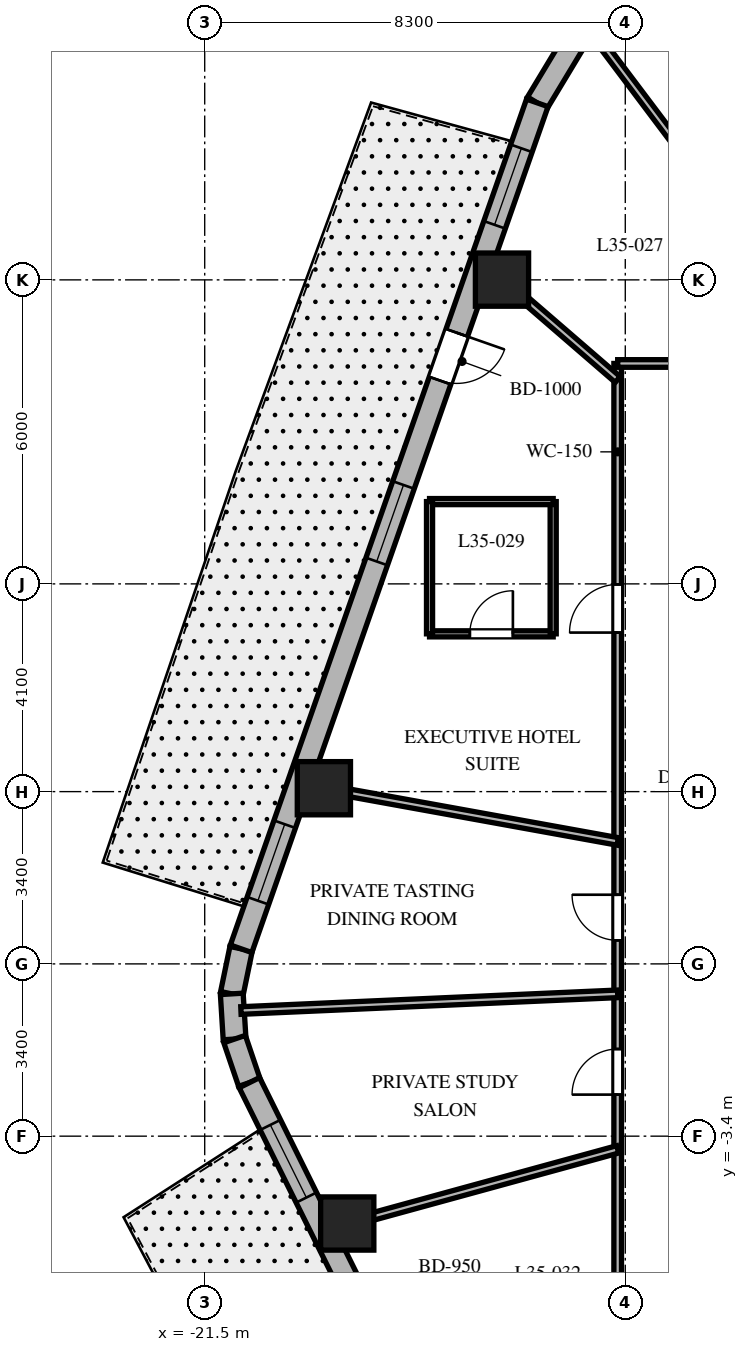
"""IFC4 building model, lengths in metres.
Left out: names, types, materials, properties, quantities, classifications, styles, units other than length and angle.
Written with IfcOpenShell. Run it as: python <this file> out.ifc"""

import sys

from ifc_helpers import new_model, si_unit, direction, frame, frame_2d, origin, origin_2d, place, context, subcontext, project, spatial, rectangle, extrude, element, fill, save


model = new_model("IFC4")
c1 = context("Model", 3, precision=1e-05, world=origin(), true_north=direction((0.0, 1.0)))
c2 = subcontext(c1, "Body", "Model", "MODEL_VIEW")
j1 = project(units=[si_unit("LENGTHUNIT", "METRE"), si_unit("PLANEANGLEUNIT", "RADIAN")], contexts=[c1])
p1 = place(None, origin())
s1 = spatial("IfcSite", under=j1, at=p1, CompositionType="ELEMENT")
p2 = place(p1, origin())
s2 = spatial("IfcBuilding", under=s1, at=p2, CompositionType="ELEMENT")
p3 = place(p2, frame((0.0, 0.0, 144.3)))
s3 = spatial("IfcBuildingStorey", under=s2, at=p3, CompositionType="ELEMENT", Elevation=144.3)
for number, where, z_axis, x_axis in (
    (1, (-15.633, 13.505, 0.0), (0.0, 0.0, 1.0), (1.0, 0.0, 0.0)),
    (2, (-19.148, 3.467, 0.0), (0.0, 0.0, 1.0), (1.0, 0.0, 0.0)),
    (3, (-18.687, -5.124, 0.0), (0.0, 0.0, 1.0), (1.0, 0.0, 0.0)),
):
    element("IfcColumn", number, at=place(p3, frame(where, z_axis=z_axis, x_axis=x_axis)), inside=s3, PredefinedType="COLUMN", context=c2, shape_type="SweptSolid", body=[
        extrude(rectangle(XDim=1.05, YDim=1.05, at=origin_2d()), origin(), (0.0, 0.0, 1.0), 3.7),
    ])
p4 = place(p3, frame((-14.214, 18.192, 0.0), z_axis=(0.0, 0.0, 1.0), x_axis=(-0.516340945502, -0.856383108193, 0.0)))
e4 = element("IfcWall", 4, at=p4, inside=s3, PredefinedType="SOLIDWALL", context=c2, shape_type="SweptSolid", body=[
    extrude(rectangle(XDim=1.4, YDim=0.45, at=frame_2d((0.7, 0.0))), origin(), (0.0, 0.0, 1.0), 3.4),
])
p5 = place(p3, frame((-20.782, 0.298, 0.0), z_axis=(0.0, 0.0, 1.0), x_axis=(-0.202570068411, -0.979267771033, 0.0)))
e5 = element("IfcWall", 5, at=p5, inside=s3, PredefinedType="SOLIDWALL", context=c2, shape_type="SweptSolid", body=[
    extrude(rectangle(XDim=0.909, YDim=0.45, at=frame_2d((0.454, 0.0))), origin(), (0.0, 0.0, 1.0), 3.4),
])
p6 = place(p3, frame((-20.966, -0.592, 0.0), z_axis=(0.0, 0.0, 1.0), x_axis=(0.061748898935, -0.998091715966, 0.0)))
e6 = element("IfcWall", 6, at=p6, inside=s3, PredefinedType="SOLIDWALL", context=c2, shape_type="SweptSolid", body=[
    extrude(rectangle(XDim=0.894, YDim=0.45, at=frame_2d((0.447, 0.0))), origin(), (0.0, 0.0, 1.0), 3.4),
])
p7 = place(p3, frame((-20.911, -1.484, 0.0), z_axis=(0.0, 0.0, 1.0), x_axis=(0.321623334353, -0.946867694453, 0.0)))
e7 = element("IfcWall", 7, at=p7, inside=s3, PredefinedType="SOLIDWALL", context=c2, shape_type="SweptSolid", body=[
    extrude(rectangle(XDim=0.909, YDim=0.45, at=frame_2d((0.454, 0.0))), origin(), (0.0, 0.0, 1.0), 3.4),
])
p8 = place(p3, frame((-14.937, 16.993, 0.0), z_axis=(0.0, 0.0, 1.0), x_axis=(-0.330431575061, -0.943829949834, 0.0)))
e8 = element("IfcWall", 8, at=p8, inside=s3, PredefinedType="SOLIDWALL", context=c2, shape_type="SweptSolid", body=[
    extrude(rectangle(XDim=17.689, YDim=0.45, at=frame_2d((8.844, 0.0))), origin(), (0.0, 0.0, 1.0), 3.4),
])
p9 = place(p8, frame((4.807, 0.0, 0.0)))
e9 = element("IfcOpeningElement", 9, at=p9, cuts=e8, PredefinedType="OPENING", context=c2, shape_type="SweptSolid", body=[
    extrude(rectangle(XDim=1.0, YDim=2.15, at=frame_2d((0.5, 1.075))), frame((0.0, 0.235, 0.0), z_axis=(0.0, -1.0, 0.0), x_axis=(1.0, 0.0, 0.0)), (0.0, 0.0, 1.0), 0.47),
])
p10 = place(p8, frame((0.95, 0.0, 0.8)))
e10 = element("IfcOpeningElement", 10, at=p10, cuts=e8, PredefinedType="OPENING", context=c2, shape_type="SweptSolid", body=[
    extrude(rectangle(XDim=1.6, YDim=1.75, at=frame_2d((0.8, 0.875))), frame((0.0, 0.235, 0.0), z_axis=(0.0, -1.0, 0.0), x_axis=(1.0, 0.0, 0.0)), (0.0, 0.0, 1.0), 0.47),
])
p11 = place(p8, frame((7.99, 0.0, 0.8)))
e11 = element("IfcOpeningElement", 11, at=p11, cuts=e8, PredefinedType="OPENING", context=c2, shape_type="SweptSolid", body=[
    extrude(rectangle(XDim=1.6, YDim=1.75, at=frame_2d((0.8, 0.875))), frame((0.0, 0.235, 0.0), z_axis=(0.0, -1.0, 0.0), x_axis=(1.0, 0.0, 0.0)), (0.0, 0.0, 1.0), 0.47),
])
p12 = place(p8, frame((15.084, 0.0, 0.8)))
e12 = element("IfcOpeningElement", 12, at=p12, cuts=e8, PredefinedType="OPENING", context=c2, shape_type="SweptSolid", body=[
    extrude(rectangle(XDim=1.6, YDim=1.75, at=frame_2d((0.8, 0.875))), frame((0.0, 0.235, 0.0), z_axis=(0.0, -1.0, 0.0), x_axis=(1.0, 0.0, 0.0)), (0.0, 0.0, 1.0), 0.47),
])
p13 = place(p3, frame((-20.618, -2.344, 0.0), z_axis=(0.0, 0.0, 1.0), x_axis=(0.444243691097, -0.895905990002, 0.0)))
e13 = element("IfcWall", 13, at=p13, inside=s3, PredefinedType="SOLIDWALL", context=c2, shape_type="SweptSolid", body=[
    extrude(rectangle(XDim=16.784, YDim=0.45, at=frame_2d((8.392, 0.0))), origin(), (0.0, 0.0, 1.0), 3.4),
])
p14 = place(p13, frame((4.535, 0.0, 0.0)))
e14 = element("IfcOpeningElement", 14, at=p14, cuts=e13, PredefinedType="OPENING", context=c2, shape_type="SweptSolid", body=[
    extrude(rectangle(XDim=0.95, YDim=2.15, at=frame_2d((0.475, 1.075))), frame((0.0, 0.235, 0.0), z_axis=(0.0, -1.0, 0.0), x_axis=(1.0, 0.0, 0.0)), (0.0, 0.0, 1.0), 0.47),
])
p15 = place(p13, frame((0.931, 0.0, 0.8)))
e15 = element("IfcOpeningElement", 15, at=p15, cuts=e13, PredefinedType="OPENING", context=c2, shape_type="SweptSolid", body=[
    extrude(rectangle(XDim=1.6, YDim=1.75, at=frame_2d((0.8, 0.875))), frame((0.0, 0.235, 0.0), z_axis=(0.0, -1.0, 0.0), x_axis=(1.0, 0.0, 0.0)), (0.0, 0.0, 1.0), 0.47),
])
p16 = place(p13, frame((7.642, 0.0, 0.8)))
e16 = element("IfcOpeningElement", 16, at=p16, cuts=e13, PredefinedType="OPENING", context=c2, shape_type="SweptSolid", body=[
    extrude(rectangle(XDim=1.6, YDim=1.75, at=frame_2d((0.8, 0.875))), frame((0.0, 0.235, 0.0), z_axis=(0.0, -1.0, 0.0), x_axis=(1.0, 0.0, 0.0)), (0.0, 0.0, 1.0), 0.47),
])
p17 = place(p13, frame((14.303, 0.0, 0.8)))
e17 = element("IfcOpeningElement", 17, at=p17, cuts=e13, PredefinedType="OPENING", context=c2, shape_type="SweptSolid", body=[
    extrude(rectangle(XDim=1.6, YDim=1.75, at=frame_2d((0.8, 0.875))), frame((0.0, 0.235, 0.0), z_axis=(0.0, -1.0, 0.0), x_axis=(1.0, 0.0, 0.0)), (0.0, 0.0, 1.0), 0.47),
])
p18 = place(p3, frame((-13.35, -11.85, 0.0), z_axis=(0.0, 0.0, 1.0), x_axis=(0.0, 1.0, 0.0)))
e18 = element("IfcWall", 18, at=p18, inside=s3, PredefinedType="PARTITIONING", context=c2, shape_type="SweptSolid", body=[
    extrude(rectangle(XDim=23.7, YDim=0.15, at=frame_2d((11.85, 0.0))), origin(), (0.0, 0.0, 1.0), 2.84),
])
p19 = place(p18, frame((18.389, 0.0, 0.0)))
e19 = element("IfcOpeningElement", 19, at=p19, cuts=e18, PredefinedType="OPENING", context=c2, shape_type="SweptSolid", body=[
    extrude(rectangle(XDim=0.95, YDim=2.03, at=frame_2d((0.475, 1.015))), frame((0.0, 0.085, 0.0), z_axis=(0.0, -1.0, 0.0), x_axis=(1.0, 0.0, 0.0)), (0.0, 0.0, 1.0), 0.17),
])
p20 = place(p18, frame((12.315, 0.0, 0.0)))
e20 = element("IfcOpeningElement", 20, at=p20, cuts=e18, PredefinedType="OPENING", context=c2, shape_type="SweptSolid", body=[
    extrude(rectangle(XDim=0.9, YDim=2.03, at=frame_2d((0.45, 1.015))), frame((0.0, 0.085, 0.0), z_axis=(0.0, -1.0, 0.0), x_axis=(1.0, 0.0, 0.0)), (0.0, 0.0, 1.0), 0.17),
])
p21 = place(p18, frame((9.27, 0.0, 0.0)))
e21 = element("IfcOpeningElement", 21, at=p21, cuts=e18, PredefinedType="OPENING", context=c2, shape_type="SweptSolid", body=[
    extrude(rectangle(XDim=0.9, YDim=2.03, at=frame_2d((0.45, 1.015))), frame((0.0, 0.085, 0.0), z_axis=(0.0, -1.0, 0.0), x_axis=(1.0, 0.0, 0.0)), (0.0, 0.0, 1.0), 0.17),
])
p22 = place(p18, frame((3.765, 0.0, 0.0)))
e22 = element("IfcOpeningElement", 22, at=p22, cuts=e18, PredefinedType="OPENING", context=c2, shape_type="SweptSolid", body=[
    extrude(rectangle(XDim=0.9, YDim=2.03, at=frame_2d((0.45, 1.015))), frame((0.0, 0.085, 0.0), z_axis=(0.0, -1.0, 0.0), x_axis=(1.0, 0.0, 0.0)), (0.0, 0.0, 1.0), 0.17),
])
p23 = place(p3, frame((-13.35, 11.85, 0.0), z_axis=(0.0, 0.0, 1.0), x_axis=(1.0, 0.0, 0.0)))
e23 = element("IfcWall", 23, at=p23, inside=s3, PredefinedType="PARTITIONING", context=c2, shape_type="SweptSolid", body=[
    extrude(rectangle(XDim=26.7, YDim=0.15, at=frame_2d((13.35, 0.0))), origin(), (0.0, 0.0, 1.0), 2.84),
])
p24 = place(p23, frame((22.7, 0.0, 0.0)))
e24 = element("IfcOpeningElement", 24, at=p24, cuts=e23, PredefinedType="OPENING", context=c2, shape_type="SweptSolid", body=[
    extrude(rectangle(XDim=0.9, YDim=2.03, at=frame_2d((0.45, 1.015))), frame((0.0, 0.085, 0.0), z_axis=(0.0, -1.0, 0.0), x_axis=(1.0, 0.0, 0.0)), (0.0, 0.0, 1.0), 0.17),
])
p25 = place(p23, frame((18.523, 0.0, 0.0)))
e25 = element("IfcOpeningElement", 25, at=p25, cuts=e23, PredefinedType="OPENING", context=c2, shape_type="SweptSolid", body=[
    extrude(rectangle(XDim=0.95, YDim=2.03, at=frame_2d((0.475, 1.015))), frame((0.0, 0.085, 0.0), z_axis=(0.0, -1.0, 0.0), x_axis=(1.0, 0.0, 0.0)), (0.0, 0.0, 1.0), 0.17),
])
p26 = place(p23, frame((12.362, 0.0, 0.0)))
e26 = element("IfcOpeningElement", 26, at=p26, cuts=e23, PredefinedType="OPENING", context=c2, shape_type="SweptSolid", body=[
    extrude(rectangle(XDim=0.95, YDim=2.03, at=frame_2d((0.475, 1.015))), frame((0.0, 0.085, 0.0), z_axis=(0.0, -1.0, 0.0), x_axis=(1.0, 0.0, 0.0)), (0.0, 0.0, 1.0), 0.17),
])
p27 = place(p23, frame((6.061, 0.0, 0.0)))
e27 = element("IfcOpeningElement", 27, at=p27, cuts=e23, PredefinedType="OPENING", context=c2, shape_type="SweptSolid", body=[
    extrude(rectangle(XDim=0.95, YDim=2.03, at=frame_2d((0.475, 1.015))), frame((0.0, 0.085, 0.0), z_axis=(0.0, -1.0, 0.0), x_axis=(1.0, 0.0, 0.0)), (0.0, 0.0, 1.0), 0.17),
])
p28 = place(p23, frame((1.886, 0.0, 0.0)))
e28 = element("IfcOpeningElement", 28, at=p28, cuts=e23, PredefinedType="OPENING", context=c2, shape_type="SweptSolid", body=[
    extrude(rectangle(XDim=0.9, YDim=2.03, at=frame_2d((0.45, 1.015))), frame((0.0, 0.085, 0.0), z_axis=(0.0, -1.0, 0.0), x_axis=(1.0, 0.0, 0.0)), (0.0, 0.0, 1.0), 0.17),
])
p29 = place(p3, frame((-8.918, 11.85, 0.0), z_axis=(0.0, 0.0, 1.0), x_axis=(-0.601347965064, 0.798987249531, 0.0)))
e29 = element("IfcWall", 29, at=p29, inside=s3, PredefinedType="PARTITIONING", context=c2, shape_type="SweptSolid", body=[
    extrude(rectangle(XDim=8.08, YDim=0.15, at=frame_2d((4.04, 0.0))), origin(), (0.0, 0.0, 1.0), 2.64),
])
p30 = place(p3, frame((-13.35, 11.533, 0.0), z_axis=(0.0, 0.0, 1.0), x_axis=(-0.756711647314, 0.65374879183, 0.0)))
e30 = element("IfcWall", 30, at=p30, inside=s3, PredefinedType="PARTITIONING", context=c2, shape_type="SweptSolid", body=[
    extrude(rectangle(XDim=3.55, YDim=0.15, at=frame_2d((1.775, 0.0))), origin(), (0.0, 0.0, 1.0), 2.64),
])
p31 = place(p3, frame((-13.35, 2.417, 0.0), z_axis=(0.0, 0.0, 1.0), x_axis=(-0.98399796473, 0.178179699761, 0.0)))
e31 = element("IfcWall", 31, at=p31, inside=s3, PredefinedType="PARTITIONING", context=c2, shape_type="SweptSolid", body=[
    extrude(rectangle(XDim=6.393, YDim=0.15, at=frame_2d((3.197, 0.0))), origin(), (0.0, 0.0, 1.0), 2.64),
])
p32 = place(p3, frame((-13.35, -0.591, 0.0), z_axis=(0.0, 0.0, 1.0), x_axis=(-0.999020359631, -0.044252921296, 0.0)))
e32 = element("IfcWall", 32, at=p32, inside=s3, PredefinedType="PARTITIONING", context=c2, shape_type="SweptSolid", body=[
    extrude(rectangle(XDim=7.442, YDim=0.15, at=frame_2d((3.721, 0.0))), origin(), (0.0, 0.0, 1.0), 2.64),
])
p33 = place(p3, frame((-13.35, -3.661, 0.0), z_axis=(0.0, 0.0, 1.0), x_axis=(-0.964397145454, -0.264458211898, 0.0)))
e33 = element("IfcWall", 33, at=p33, inside=s3, PredefinedType="PARTITIONING", context=c2, shape_type="SweptSolid", body=[
    extrude(rectangle(XDim=6.039, YDim=0.15, at=frame_2d((3.019, 0.0))), origin(), (0.0, 0.0, 1.0), 2.64),
])
p34 = place(p3, frame((-17.063, 6.514, 0.0), z_axis=(0.0, 0.0, 1.0), x_axis=(1.0, 0.0, 0.0)))
e34 = element("IfcWall", 34, at=p34, inside=s3, PredefinedType="PARTITIONING", context=c2, shape_type="SweptSolid", body=[
    extrude(rectangle(XDim=2.44, YDim=0.12, at=frame_2d((1.22, 0.0))), origin(), (0.0, 0.0, 1.0), 2.972),
])
p35 = place(p34, frame((0.795, 0.0, 0.0)))
e35 = element("IfcOpeningElement", 35, at=p35, cuts=e34, PredefinedType="OPENING", context=c2, shape_type="SweptSolid", body=[
    extrude(rectangle(XDim=0.85, YDim=2.03, at=frame_2d((0.425, 1.015))), frame((0.0, 0.07, 0.0), z_axis=(0.0, -1.0, 0.0), x_axis=(1.0, 0.0, 0.0)), (0.0, 0.0, 1.0), 0.14),
])
p36 = place(p3, frame((-14.623, 6.514, 0.0), z_axis=(0.0, 0.0, 1.0), x_axis=(0.0, 1.0, 0.0)))
e36 = element("IfcWall", 36, at=p36, inside=s3, PredefinedType="PARTITIONING", context=c2, shape_type="SweptSolid", body=[
    extrude(rectangle(XDim=2.61, YDim=0.12, at=frame_2d((1.305, 0.0))), origin(), (0.0, 0.0, 1.0), 2.972),
])
p37 = place(p3, frame((-14.623, 9.124, 0.0), z_axis=(0.0, 0.0, 1.0), x_axis=(-1.0, 0.0, 0.0)))
e37 = element("IfcWall", 37, at=p37, inside=s3, PredefinedType="PARTITIONING", context=c2, shape_type="SweptSolid", body=[
    extrude(rectangle(XDim=2.44, YDim=0.12, at=frame_2d((1.22, 0.0))), origin(), (0.0, 0.0, 1.0), 2.64),
])
p38 = place(p3, frame((-17.063, 9.124, 0.0), z_axis=(0.0, 0.0, 1.0), x_axis=(0.0, -1.0, 0.0)))
e38 = element("IfcWall", 38, at=p38, inside=s3, PredefinedType="PARTITIONING", context=c2, shape_type="SweptSolid", body=[
    extrude(rectangle(XDim=2.61, YDim=0.12, at=frame_2d((1.305, 0.0))), origin(), (0.0, 0.0, 1.0), 2.64),
])
p39 = place(p9, origin())
e39 = element("IfcDoor", 39, at=p39, inside=s3, OperationType="SINGLE_SWING_LEFT", PredefinedType="DOOR", context=c2, shape_type="SweptSolid", body=[
    extrude(rectangle(XDim=1.0, YDim=2.15, at=frame_2d((0.5, 1.075))), frame((0.0, 0.025, 0.0), z_axis=(0.0, -1.0, 0.0), x_axis=(1.0, 0.0, 0.0)), (0.0, 0.0, 1.0), 0.05),
])
fill(e9, e39)
p40 = place(p10, origin())
e40 = element("IfcWindow", 40, at=p40, inside=s3, PartitioningType="SINGLE_PANEL", PredefinedType="WINDOW", context=c2, shape_type="SweptSolid", body=[
    extrude(rectangle(XDim=1.6, YDim=1.75, at=frame_2d((0.8, 0.875))), frame((0.0, 0.03, 0.0), z_axis=(0.0, -1.0, 0.0), x_axis=(1.0, 0.0, 0.0)), (0.0, 0.0, 1.0), 0.06),
])
fill(e10, e40)
p41 = place(p11, origin())
e41 = element("IfcWindow", 41, at=p41, inside=s3, PartitioningType="SINGLE_PANEL", PredefinedType="WINDOW", context=c2, shape_type="SweptSolid", body=[
    extrude(rectangle(XDim=1.6, YDim=1.75, at=frame_2d((0.8, 0.875))), frame((0.0, 0.03, 0.0), z_axis=(0.0, -1.0, 0.0), x_axis=(1.0, 0.0, 0.0)), (0.0, 0.0, 1.0), 0.06),
])
fill(e11, e41)
p42 = place(p12, origin())
e42 = element("IfcWindow", 42, at=p42, inside=s3, PartitioningType="SINGLE_PANEL", PredefinedType="WINDOW", context=c2, shape_type="SweptSolid", body=[
    extrude(rectangle(XDim=1.6, YDim=1.75, at=frame_2d((0.8, 0.875))), frame((0.0, 0.03, 0.0), z_axis=(0.0, -1.0, 0.0), x_axis=(1.0, 0.0, 0.0)), (0.0, 0.0, 1.0), 0.06),
])
fill(e12, e42)
p43 = place(p15, origin())
e43 = element("IfcWindow", 43, at=p43, inside=s3, PartitioningType="SINGLE_PANEL", PredefinedType="WINDOW", context=c2, shape_type="SweptSolid", body=[
    extrude(rectangle(XDim=1.6, YDim=1.75, at=frame_2d((0.8, 0.875))), frame((0.0, 0.03, 0.0), z_axis=(0.0, -1.0, 0.0), x_axis=(1.0, 0.0, 0.0)), (0.0, 0.0, 1.0), 0.06),
])
fill(e15, e43)
p44 = place(p19, origin())
e44 = element("IfcDoor", 44, at=p44, inside=s3, OperationType="SINGLE_SWING_LEFT", PredefinedType="DOOR", context=c2, shape_type="SweptSolid", body=[
    extrude(rectangle(XDim=0.95, YDim=2.03, at=frame_2d((0.475, 1.015))), frame((0.0, 0.025, 0.0), z_axis=(0.0, -1.0, 0.0), x_axis=(1.0, 0.0, 0.0)), (0.0, 0.0, 1.0), 0.05),
])
fill(e19, e44)
p45 = place(p35, origin())
e45 = element("IfcDoor", 45, at=p45, inside=s3, OperationType="SINGLE_SWING_RIGHT", PredefinedType="DOOR", context=c2, shape_type="SweptSolid", body=[
    extrude(rectangle(XDim=0.85, YDim=2.03, at=frame_2d((0.425, 1.015))), frame((0.0, 0.025, 0.0), z_axis=(0.0, -1.0, 0.0), x_axis=(1.0, 0.0, 0.0)), (0.0, 0.0, 1.0), 0.05),
])
fill(e35, e45)
p46 = place(p20, origin())
e46 = element("IfcDoor", 46, at=p46, inside=s3, OperationType="SINGLE_SWING_RIGHT", PredefinedType="DOOR", context=c2, shape_type="SweptSolid", body=[
    extrude(rectangle(XDim=0.9, YDim=2.03, at=frame_2d((0.45, 1.015))), frame((0.0, 0.025, 0.0), z_axis=(0.0, -1.0, 0.0), x_axis=(1.0, 0.0, 0.0)), (0.0, 0.0, 1.0), 0.05),
])
fill(e20, e46)
p47 = place(p21, origin())
e47 = element("IfcDoor", 47, at=p47, inside=s3, OperationType="SINGLE_SWING_LEFT", PredefinedType="DOOR", context=c2, shape_type="SweptSolid", body=[
    extrude(rectangle(XDim=0.9, YDim=2.03, at=frame_2d((0.45, 1.015))), frame((0.0, 0.025, 0.0), z_axis=(0.0, -1.0, 0.0), x_axis=(1.0, 0.0, 0.0)), (0.0, 0.0, 1.0), 0.05),
])
fill(e21, e47)
save(model, sys.argv[1])
